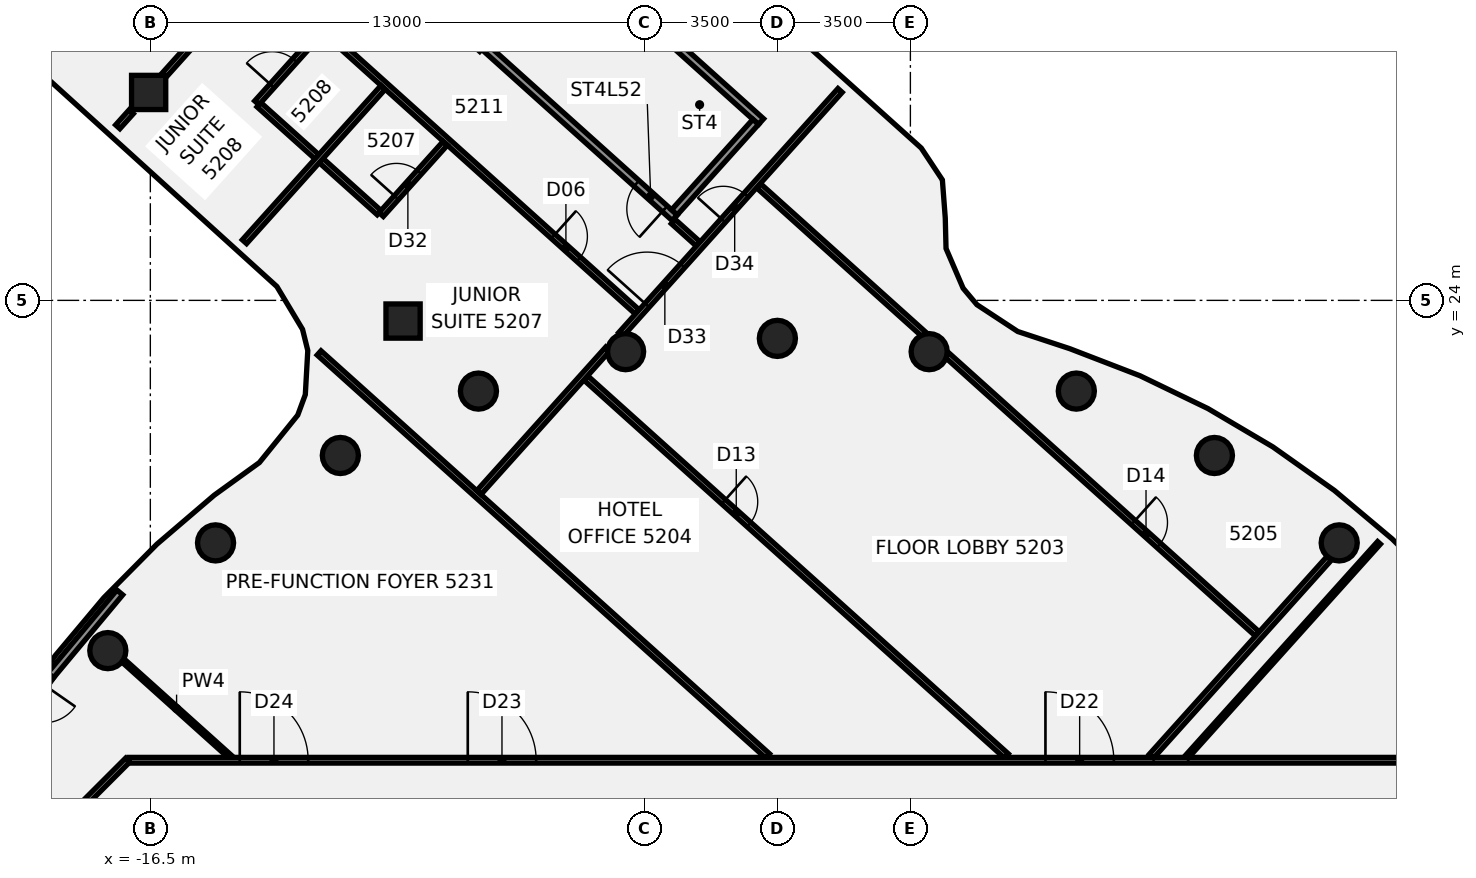
"""IFC4 building model, lengths in metres.
Left out: names, types, materials, properties, quantities, classifications, styles, units other than length and angle.
Written with IfcOpenShell. Run it as: python <this file> out.ifc"""

import sys

from ifc_helpers import new_model, si_unit, direction, frame, frame_2d, origin, origin_2d, place, context, subcontext, project, spatial, rectangle, circle, extrude, element, fill, save


model = new_model("IFC4")
c1 = context("Model", 3, precision=1e-05, world=origin(), true_north=direction((0.0, 1.0)))
c2 = subcontext(c1, "Body", "Model", "MODEL_VIEW")
j1 = project(units=[si_unit("LENGTHUNIT", "METRE"), si_unit("PLANEANGLEUNIT", "RADIAN")], contexts=[c1])
p1 = place(None, origin())
s1 = spatial("IfcSite", under=j1, at=p1, CompositionType="ELEMENT")
p2 = place(p1, origin())
s2 = spatial("IfcBuilding", under=s1, at=p2, CompositionType="ELEMENT")
p3 = place(p2, frame((0.0, 0.0, 207.7)))
s3 = spatial("IfcBuildingStorey", under=s2, at=p3, CompositionType="ELEMENT", Elevation=207.7)
for number, where, z_axis, x_axis in (
    (1, (14.784, 17.619, -0.14), (0.0, 0.0, 1.0), (1.0, 0.0, 0.0)),
    (2, (11.5, 19.919, -0.14), (0.0, 0.0, 1.0), (1.0, 0.0, 0.0)),
    (3, (7.866, 21.613, -0.14), (0.0, 0.0, 1.0), (1.0, 0.0, 0.0)),
    (4, (3.994, 22.651, -0.14), (0.0, 0.0, 1.0), (1.0, 0.0, 0.0)),
    (5, (0.0, 23.0, -0.14), (0.0, 0.0, 1.0), (1.0, 0.0, 0.0)),
    (6, (-3.994, 22.651, -0.14), (0.0, 0.0, 1.0), (1.0, 0.0, 0.0)),
    (7, (-7.866, 21.613, -0.14), (0.0, 0.0, 1.0), (1.0, 0.0, 0.0)),
    (8, (-11.5, 19.919, -0.14), (0.0, 0.0, 1.0), (1.0, 0.0, 0.0)),
    (9, (-14.784, 17.619, -0.14), (0.0, 0.0, 1.0), (1.0, 0.0, 0.0)),
    (10, (-17.619, 14.784, -0.14), (0.0, 0.0, 1.0), (1.0, 0.0, 0.0)),
):
    element("IfcColumn", number, at=place(p3, frame(where, z_axis=z_axis, x_axis=x_axis)), inside=s3, PredefinedType="COLUMN", context=c2, shape_type="SweptSolid", body=[
        extrude(circle(Radius=0.475, at=origin_2d()), origin(), (0.0, 0.0, 1.0), 3.6),
    ])
p4 = place(p3, frame((-16.545, 29.471, -0.138), z_axis=(-0.036894080952, -0.083794490133, 0.995799834412), x_axis=(0.666515072004, 0.740397972357, 0.08699713398)))
e11 = element("IfcColumn", 11, at=p4, inside=s3, PredefinedType="COLUMN", context=c2, shape_type="SweptSolid", body=[
    extrude(rectangle(XDim=0.9, YDim=0.9, at=origin_2d()), origin(), (0.0, 0.0, 1.0), 3.587),
])
p5 = place(p3, frame((-9.85, 23.456, -0.139), z_axis=(-0.006913509496, -0.049885715582, 0.998731004209), x_axis=(0.668247415628, 0.742767998212, 0.04172639858)))
e12 = element("IfcColumn", 12, at=p5, inside=s3, PredefinedType="COLUMN", context=c2, shape_type="SweptSolid", body=[
    extrude(rectangle(XDim=0.9, YDim=0.9, at=origin_2d()), origin(), (0.0, 0.0, 1.0), 3.602),
])
p6 = place(p3, frame((-17.217, 14.523, 0.0), z_axis=(0.0, 0.0, 1.0), x_axis=(0.743919147791, -0.668269632372, 0.0)))
e13 = element("IfcWall", 13, at=p6, inside=s3, PredefinedType="PARTITIONING", context=c2, shape_type="SweptSolid", body=[
    extrude(rectangle(XDim=3.786, YDim=0.1, at=frame_2d((1.893, 0.0))), origin(), (0.0, 0.0, 1.0), 2.864),
])
p7 = place(p3, frame((-13.642, 29.148, 0.0), z_axis=(0.0, 0.0, 1.0), x_axis=(0.744007909304, -0.668170809668, 0.0)))
e14 = element("IfcWall", 14, at=p7, inside=s3, PredefinedType="PARTITIONING", context=c2, shape_type="SweptSolid", body=[
    extrude(rectangle(XDim=4.25, YDim=0.15, at=frame_2d((2.125, 0.0))), origin(), (0.0, 0.0, 1.0), 2.864),
])
p8 = place(p3, frame((-13.612, 32.616, 0.0), z_axis=(0.0, 0.0, 1.0), x_axis=(0.743714415992, -0.668497470037, 0.0)))
e15 = element("IfcWall", 15, at=p8, inside=s3, PredefinedType="PARTITIONING", context=c2, shape_type="SweptSolid", body=[
    extrude(rectangle(XDim=13.34, YDim=0.15, at=frame_2d((6.67, 0.0))), origin(), (0.0, 0.0, 1.0), 2.864),
])
p9 = place(p8, frame((10.37, 0.0, 0.0)))
e16 = element("IfcOpeningElement", 16, at=p9, cuts=e15, PredefinedType="OPENING", context=c2, shape_type="SweptSolid", body=[
    extrude(rectangle(XDim=0.9, YDim=2.1, at=frame_2d((0.45, 1.05))), frame((0.0, 0.085, 0.0), z_axis=(0.0, -1.0, 0.0), x_axis=(1.0, 0.0, 0.0)), (0.0, 0.0, 1.0), 0.17),
])
p10 = place(p8, frame((0.82, 0.0, 0.0)))
e17 = element("IfcOpeningElement", 17, at=p10, cuts=e15, PredefinedType="OPENING", context=c2, shape_type="SweptSolid", body=[
    extrude(rectangle(XDim=0.9, YDim=2.1, at=frame_2d((0.45, 1.05))), frame((0.0, 0.085, 0.0), z_axis=(0.0, -1.0, 0.0), x_axis=(1.0, 0.0, 0.0)), (0.0, 0.0, 1.0), 0.17),
])
p11 = place(p3, frame((-2.739, 26.073, 0.0), z_axis=(0.0, 0.0, 1.0), x_axis=(0.743969878474, -0.668213154557, 0.0)))
e18 = element("IfcWall", 18, at=p11, inside=s3, PredefinedType="PARTITIONING", context=c2, shape_type="SweptSolid", body=[
    extrude(rectangle(XDim=0.88, YDim=0.15, at=frame_2d((0.44, 0.0))), origin(), (0.0, 0.0, 1.0), 2.864),
])
p12 = place(p3, frame((-12.059, 22.617, 0.0), z_axis=(0.0, 0.0, 1.0), x_axis=(0.743880712791, -0.668312415819, 0.0)))
e19 = element("IfcWall", 19, at=p12, inside=s3, PredefinedType="PARTITIONING", context=c2, shape_type="SweptSolid", body=[
    extrude(rectangle(XDim=15.866, YDim=0.15, at=frame_2d((7.933, 0.0))), origin(), (0.0, 0.0, 1.0), 2.864),
])
p13 = place(p3, frame((-5.04, 21.958, 0.0), z_axis=(0.0, 0.0, 1.0), x_axis=(0.743847907663, -0.668348928528, 0.0)))
e20 = element("IfcWall", 20, at=p13, inside=s3, PredefinedType="PARTITIONING", context=c2, shape_type="SweptSolid", body=[
    extrude(rectangle(XDim=14.878, YDim=0.15, at=frame_2d((7.439, 0.0))), origin(), (0.0, 0.0, 1.0), 2.864),
])
p14 = place(p13, frame((4.87, 0.0, 0.0)))
e21 = element("IfcOpeningElement", 21, at=p14, cuts=e20, PredefinedType="OPENING", context=c2, shape_type="SweptSolid", body=[
    extrude(rectangle(XDim=0.9, YDim=2.1, at=frame_2d((0.45, 1.05))), frame((0.0, 0.085, 0.0), z_axis=(0.0, -1.0, 0.0), x_axis=(1.0, 0.0, 0.0)), (0.0, 0.0, 1.0), 0.17),
])
p15 = place(p3, frame((-0.494, 27.015, 0.0), z_axis=(0.0, 0.0, 1.0), x_axis=(0.743820326934, -0.668379623597, 0.0)))
e22 = element("IfcWall", 22, at=p15, inside=s3, PredefinedType="PARTITIONING", context=c2, shape_type="SweptSolid", body=[
    extrude(rectangle(XDim=5.857, YDim=0.15, at=frame_2d((2.929, 0.0))), origin(), (0.0, 0.0, 1.0), 2.864),
])
p16 = place(p3, frame((4.457, 22.567, 0.0), z_axis=(0.0, 0.0, 1.0), x_axis=(0.74382000742, -0.668379979175, 0.0)))
e23 = element("IfcWall", 23, at=p16, inside=s3, PredefinedType="PARTITIONING", context=c2, shape_type="SweptSolid", body=[
    extrude(rectangle(XDim=10.984, YDim=0.15, at=frame_2d((5.492, 0.0))), origin(), (0.0, 0.0, 1.0), 2.864),
])
p17 = place(p16, frame((6.6, 0.0, 0.0)))
e24 = element("IfcOpeningElement", 24, at=p17, cuts=e23, PredefinedType="OPENING", context=c2, shape_type="SweptSolid", body=[
    extrude(rectangle(XDim=0.9, YDim=2.1, at=frame_2d((0.45, 1.05))), frame((0.0, 0.085, 0.0), z_axis=(0.0, -1.0, 0.0), x_axis=(1.0, 0.0, 0.0)), (0.0, 0.0, 1.0), 0.17),
])
p18 = place(p3, frame((-17.065, 11.9, 0.0), z_axis=(0.0, 0.0, 1.0), x_axis=(1.0, 0.0, 0.0)))
e25 = element("IfcWall", 25, at=p18, inside=s3, PredefinedType="PARTITIONING", context=c2, shape_type="SweptSolid", body=[
    extrude(rectangle(XDim=34.165, YDim=0.15, at=frame_2d((17.083, 0.0))), origin(), (0.0, 0.0, 1.0), 2.864),
])
p19 = place(p18, frame((24.119, 0.0, 0.0)))
e26 = element("IfcOpeningElement", 26, at=p19, cuts=e25, PredefinedType="OPENING", context=c2, shape_type="SweptSolid", body=[
    extrude(rectangle(XDim=1.8, YDim=2.1, at=frame_2d((0.9, 1.05))), frame((0.0, 0.085, 0.0), z_axis=(0.0, -1.0, 0.0), x_axis=(1.0, 0.0, 0.0)), (0.0, 0.0, 1.0), 0.17),
])
p20 = place(p18, frame((8.918, 0.0, 0.0)))
e27 = element("IfcOpeningElement", 27, at=p20, cuts=e25, PredefinedType="OPENING", context=c2, shape_type="SweptSolid", body=[
    extrude(rectangle(XDim=1.8, YDim=2.1, at=frame_2d((0.9, 1.05))), frame((0.0, 0.085, 0.0), z_axis=(0.0, -1.0, 0.0), x_axis=(1.0, 0.0, 0.0)), (0.0, 0.0, 1.0), 0.17),
])
p21 = place(p18, frame((2.918, 0.0, 0.0)))
e28 = element("IfcOpeningElement", 28, at=p21, cuts=e25, PredefinedType="OPENING", context=c2, shape_type="SweptSolid", body=[
    extrude(rectangle(XDim=1.8, YDim=2.1, at=frame_2d((0.9, 1.05))), frame((0.0, 0.085, 0.0), z_axis=(0.0, -1.0, 0.0), x_axis=(1.0, 0.0, 0.0)), (0.0, 0.0, 1.0), 0.17),
])
p22 = place(p3, frame((-18.872, 10.128, 0.0), z_axis=(0.0, 0.0, 1.0), x_axis=(0.707106781187, 0.707106781187, 0.0)))
e29 = element("IfcWall", 29, at=p22, inside=s3, PredefinedType="PARTITIONING", context=c2, shape_type="SweptSolid", body=[
    extrude(rectangle(XDim=2.505, YDim=0.15, at=frame_2d((1.253, 0.0))), origin(), (0.0, 0.0, 1.0), 2.864),
])
p23 = place(p3, frame((-17.357, 28.567, 0.0), z_axis=(0.0, 0.0, 1.0), x_axis=(0.668250502002, 0.743936332339, 0.0)))
e30 = element("IfcWall", 30, at=p23, inside=s3, PredefinedType="PARTITIONING", context=c2, shape_type="SweptSolid", body=[
    extrude(rectangle(XDim=0.529, YDim=0.15, at=frame_2d((0.265, 0.0))), origin(), (0.0, 0.0, 1.0), 2.864),
])
p24 = place(p3, frame((-16.292, 29.752, 0.0), z_axis=(0.0, 0.0, 1.0), x_axis=(0.668305639609, 0.743886800573, 0.0)))
e31 = element("IfcWall", 31, at=p24, inside=s3, PredefinedType="PARTITIONING", context=c2, shape_type="SweptSolid", body=[
    extrude(rectangle(XDim=9.93, YDim=0.15, at=frame_2d((4.965, 0.0))), origin(), (0.0, 0.0, 1.0), 2.864),
])
p25 = place(p24, frame((4.073, 0.0, 0.0)))
e32 = element("IfcOpeningElement", 32, at=p25, cuts=e31, PredefinedType="OPENING", context=c2, shape_type="SweptSolid", body=[
    extrude(rectangle(XDim=1.8, YDim=2.1, at=frame_2d((0.9, 1.05))), frame((0.0, 0.085, 0.0), z_axis=(0.0, -1.0, 0.0), x_axis=(1.0, 0.0, 0.0)), (0.0, 0.0, 1.0), 0.17),
])
p26 = place(p3, frame((-14.023, 25.544, 0.0), z_axis=(0.0, 0.0, 1.0), x_axis=(0.668287123149, 0.743903435288, 0.0)))
e33 = element("IfcWall", 33, at=p26, inside=s3, PredefinedType="PARTITIONING", context=c2, shape_type="SweptSolid", body=[
    extrude(rectangle(XDim=5.457, YDim=0.15, at=frame_2d((2.728, 0.0))), origin(), (0.0, 0.0, 1.0), 2.864),
])
p27 = place(p3, frame((-13.698, 29.198, 0.0), z_axis=(0.0, 0.0, 1.0), x_axis=(0.668418641187, 0.743785264787, 0.0)))
e34 = element("IfcWall", 34, at=p27, inside=s3, PredefinedType="PARTITIONING", context=c2, shape_type="SweptSolid", body=[
    extrude(rectangle(XDim=2.52, YDim=0.15, at=frame_2d((1.26, 0.0))), origin(), (0.0, 0.0, 1.0), 2.864),
])
p28 = place(p27, frame((0.6, 0.0, 0.0)))
e35 = element("IfcOpeningElement", 35, at=p28, cuts=e34, PredefinedType="OPENING", context=c2, shape_type="SweptSolid", body=[
    extrude(rectangle(XDim=0.9, YDim=2.1, at=frame_2d((0.45, 1.05))), frame((0.0, 0.085, 0.0), z_axis=(0.0, -1.0, 0.0), x_axis=(1.0, 0.0, 0.0)), (0.0, 0.0, 1.0), 0.17),
])
p29 = place(p3, frame((-10.425, 26.258, 0.0), z_axis=(0.0, 0.0, 1.0), x_axis=(0.668418641187, 0.743785264787, 0.0)))
e36 = element("IfcWall", 36, at=p29, inside=s3, PredefinedType="PARTITIONING", context=c2, shape_type="SweptSolid", body=[
    extrude(rectangle(XDim=2.52, YDim=0.15, at=frame_2d((1.26, 0.0))), origin(), (0.0, 0.0, 1.0), 2.864),
])
p30 = place(p29, frame((0.6, 0.0, 0.0)))
e37 = element("IfcOpeningElement", 37, at=p30, cuts=e36, PredefinedType="OPENING", context=c2, shape_type="SweptSolid", body=[
    extrude(rectangle(XDim=0.9, YDim=2.1, at=frame_2d((0.45, 1.05))), frame((0.0, 0.085, 0.0), z_axis=(0.0, -1.0, 0.0), x_axis=(1.0, 0.0, 0.0)), (0.0, 0.0, 1.0), 0.17),
])
p31 = place(p3, frame((-7.853, 18.946, 0.0), z_axis=(0.0, 0.0, 1.0), x_axis=(0.668252482961, 0.743934552912, 0.0)))
e38 = element("IfcWall", 38, at=p31, inside=s3, PredefinedType="PARTITIONING", context=c2, shape_type="SweptSolid", body=[
    extrude(rectangle(XDim=5.078, YDim=0.15, at=frame_2d((2.539, 0.0))), origin(), (0.0, 0.0, 1.0), 2.864),
])
p32 = place(p3, frame((-4.119, 23.102, 0.0), z_axis=(0.0, 0.0, 1.0), x_axis=(0.668236247313, 0.743949136552, 0.0)))
e39 = element("IfcWall", 39, at=p32, inside=s3, PredefinedType="PARTITIONING", context=c2, shape_type="SweptSolid", body=[
    extrude(rectangle(XDim=8.632, YDim=0.15, at=frame_2d((4.316, 0.0))), origin(), (0.0, 0.0, 1.0), 2.864),
])
p33 = place(p32, frame((1.033, 0.0, 0.0)))
e40 = element("IfcOpeningElement", 40, at=p33, cuts=e39, PredefinedType="OPENING", context=c2, shape_type="SweptSolid", body=[
    extrude(rectangle(XDim=1.4, YDim=2.1, at=frame_2d((0.7, 1.05))), frame((0.0, 0.085, 0.0), z_axis=(0.0, -1.0, 0.0), x_axis=(1.0, 0.0, 0.0)), (0.0, 0.0, 1.0), 0.17),
])
p34 = place(p32, frame((4.033, 0.0, 0.0)))
e41 = element("IfcOpeningElement", 41, at=p34, cuts=e39, PredefinedType="OPENING", context=c2, shape_type="SweptSolid", body=[
    extrude(rectangle(XDim=0.9, YDim=2.1, at=frame_2d((0.45, 1.05))), frame((0.0, 0.085, 0.0), z_axis=(0.0, -1.0, 0.0), x_axis=(1.0, 0.0, 0.0)), (0.0, 0.0, 1.0), 0.17),
])
p35 = place(p3, frame((10.772, 11.989, 0.0), z_axis=(0.0, 0.0, 1.0), x_axis=(0.66831410143, 0.743879198412, 0.0)))
e42 = element("IfcWall", 42, at=p35, inside=s3, PredefinedType="PARTITIONING", context=c2, shape_type="SweptSolid", body=[
    extrude(rectangle(XDim=7.57, YDim=0.1, at=frame_2d((3.785, 0.0))), origin(), (0.0, 0.0, 1.0), 2.864),
])
p36 = place(p3, frame((9.843, 12.008, 0.0), z_axis=(0.0, 0.0, 1.0), x_axis=(0.668361660756, 0.743836467533, 0.0)))
e43 = element("IfcWall", 43, at=p36, inside=s3, PredefinedType="PARTITIONING", context=c2, shape_type="SweptSolid", body=[
    extrude(rectangle(XDim=7.003, YDim=0.15, at=frame_2d((3.501, 0.0))), origin(), (0.0, 0.0, 1.0), 2.864),
])
p37 = place(p3, frame((-17.304, 16.315, 0.0), z_axis=(0.0, 0.0, 1.0), x_axis=(-0.640631790318, -0.767848233203, 0.0)))
e44 = element("IfcWall", 44, at=p37, inside=s3, PredefinedType="SOLIDWALL", context=c2, shape_type="SweptSolid", body=[
    extrude(rectangle(XDim=2.844, YDim=0.2, at=frame_2d((1.422, 0.0))), origin(), (0.0, 0.0, 1.0), 3.46),
])
p38 = place(p3, frame((-19.126, 14.132, 0.0), z_axis=(0.0, 0.0, 1.0), x_axis=(-0.572150562029, -0.820148605053, 0.0)))
e45 = element("IfcWall", 45, at=p38, inside=s3, PredefinedType="SOLIDWALL", context=c2, shape_type="SweptSolid", body=[
    extrude(rectangle(XDim=1.6, YDim=0.2, at=frame_2d((0.8, 0.0))), origin(), (0.0, 0.0, 1.0), 3.46),
])
p39 = place(p38, frame((0.3, 0.0, 0.0)))
e46 = element("IfcOpeningElement", 46, at=p39, cuts=e45, PredefinedType="OPENING", context=c2, shape_type="SweptSolid", body=[
    extrude(rectangle(XDim=1.0, YDim=2.4, at=frame_2d((0.5, 1.2))), frame((0.0, 0.11, 0.0), z_axis=(0.0, -1.0, 0.0), x_axis=(1.0, 0.0, 0.0)), (0.0, 0.0, 1.0), 0.22),
])
p40 = place(p3, frame((-2.702, 26.175, -0.14), z_axis=(0.0, 0.0, 1.0), x_axis=(-0.743866429865, 0.66832831342, 0.0)))
e47 = element("IfcWall", 47, at=p40, inside=s3, PredefinedType="SHEAR", context=c2, shape_type="SweptSolid", body=[
    extrude(rectangle(XDim=6.7, YDim=0.2, at=frame_2d((3.35, 0.0))), origin(), (0.0, 0.0, 1.0), 3.004),
])
p41 = place(p40, frame((0.35, 0.0, 0.0)))
e48 = element("IfcOpeningElement", 48, at=p41, cuts=e47, PredefinedType="OPENING", context=c2, shape_type="SweptSolid", body=[
    extrude(rectangle(XDim=1.0, YDim=2.1, at=frame_2d((0.5, 1.05))), frame((0.0, 0.11, 0.0), z_axis=(0.0, -1.0, 0.0), x_axis=(1.0, 0.0, 0.0)), (0.0, 0.0, 1.0), 0.22),
])
p42 = place(p3, frame((-0.429, 28.704, -0.14), z_axis=(0.0, 0.0, 1.0), x_axis=(-0.743866429865, 0.66832831342, 0.0)))
e49 = element("IfcWall", 49, at=p42, inside=s3, PredefinedType="SHEAR", context=c2, shape_type="SweptSolid", body=[
    extrude(rectangle(XDim=6.7, YDim=0.2, at=frame_2d((3.35, 0.0))), origin(), (0.0, 0.0, 1.0), 3.004),
])
p43 = place(p3, frame((-0.571, 28.697, -0.14), z_axis=(0.0, 0.0, 1.0), x_axis=(-0.668370152404, -0.743828837419, 0.0)))
e50 = element("IfcWall", 50, at=p43, inside=s3, PredefinedType="SHEAR", context=c2, shape_type="SweptSolid", body=[
    extrude(rectangle(XDim=3.2, YDim=0.2, at=frame_2d((1.6, 0.0))), origin(), (0.0, 0.0, 1.0), 3.004),
])
p44 = place(p9, frame((0.9, 0.0, 0.0), z_axis=(0.0, 0.0, 1.0), x_axis=(-1.0, 0.0, 0.0)))
e51 = element("IfcDoor", 51, at=p44, inside=s3, OperationType="SINGLE_SWING_RIGHT", PredefinedType="DOOR", context=c2, shape_type="SweptSolid", body=[
    extrude(rectangle(XDim=0.9, YDim=2.1, at=frame_2d((0.45, 1.05))), frame((0.0, 0.025, 0.0), z_axis=(0.0, -1.0, 0.0), x_axis=(1.0, 0.0, 0.0)), (0.0, 0.0, 1.0), 0.05),
])
fill(e16, e51)
p45 = place(p14, frame((0.9, 0.0, 0.0), z_axis=(0.0, 0.0, 1.0), x_axis=(-1.0, 0.0, 0.0)))
e52 = element("IfcDoor", 52, at=p45, inside=s3, OperationType="SINGLE_SWING_LEFT", PredefinedType="DOOR", context=c2, shape_type="SweptSolid", body=[
    extrude(rectangle(XDim=0.9, YDim=2.1, at=frame_2d((0.45, 1.05))), frame((0.0, 0.025, 0.0), z_axis=(0.0, -1.0, 0.0), x_axis=(1.0, 0.0, 0.0)), (0.0, 0.0, 1.0), 0.05),
])
fill(e21, e52)
p46 = place(p17, origin())
e53 = element("IfcDoor", 53, at=p46, inside=s3, OperationType="SINGLE_SWING_LEFT", PredefinedType="DOOR", context=c2, shape_type="SweptSolid", body=[
    extrude(rectangle(XDim=0.9, YDim=2.1, at=frame_2d((0.45, 1.05))), frame((0.0, 0.025, 0.0), z_axis=(0.0, -1.0, 0.0), x_axis=(1.0, 0.0, 0.0)), (0.0, 0.0, 1.0), 0.05),
])
fill(e24, e53)
p47 = place(p19, frame((1.8, 0.0, 0.0), z_axis=(0.0, 0.0, 1.0), x_axis=(-1.0, 0.0, 0.0)))
e54 = element("IfcDoor", 54, at=p47, inside=s3, OperationType="DOUBLE_DOOR_SINGLE_SWING", PredefinedType="DOOR", context=c2, shape_type="SweptSolid", body=[
    extrude(rectangle(XDim=1.8, YDim=2.1, at=frame_2d((0.9, 1.05))), frame((0.0, 0.025, 0.0), z_axis=(0.0, -1.0, 0.0), x_axis=(1.0, 0.0, 0.0)), (0.0, 0.0, 1.0), 0.05),
])
fill(e26, e54)
p48 = place(p20, origin())
e55 = element("IfcDoor", 55, at=p48, inside=s3, OperationType="DOUBLE_DOOR_SINGLE_SWING", PredefinedType="DOOR", context=c2, shape_type="SweptSolid", body=[
    extrude(rectangle(XDim=1.8, YDim=2.1, at=frame_2d((0.9, 1.05))), frame((0.0, 0.025, 0.0), z_axis=(0.0, -1.0, 0.0), x_axis=(1.0, 0.0, 0.0)), (0.0, 0.0, 1.0), 0.05),
])
fill(e27, e55)
p49 = place(p21, origin())
e56 = element("IfcDoor", 56, at=p49, inside=s3, OperationType="DOUBLE_DOOR_SINGLE_SWING", PredefinedType="DOOR", context=c2, shape_type="SweptSolid", body=[
    extrude(rectangle(XDim=1.8, YDim=2.1, at=frame_2d((0.9, 1.05))), frame((0.0, 0.025, 0.0), z_axis=(0.0, -1.0, 0.0), x_axis=(1.0, 0.0, 0.0)), (0.0, 0.0, 1.0), 0.05),
])
fill(e28, e56)
p50 = place(p28, frame((0.9, 0.0, 0.0), z_axis=(0.0, 0.0, 1.0), x_axis=(-1.0, 0.0, 0.0)))
e57 = element("IfcDoor", 57, at=p50, inside=s3, OperationType="SINGLE_SWING_LEFT", PredefinedType="DOOR", context=c2, shape_type="SweptSolid", body=[
    extrude(rectangle(XDim=0.9, YDim=2.1, at=frame_2d((0.45, 1.05))), frame((0.0, 0.025, 0.0), z_axis=(0.0, -1.0, 0.0), x_axis=(1.0, 0.0, 0.0)), (0.0, 0.0, 1.0), 0.05),
])
fill(e35, e57)
p51 = place(p30, origin())
e58 = element("IfcDoor", 58, at=p51, inside=s3, OperationType="SINGLE_SWING_RIGHT", PredefinedType="DOOR", context=c2, shape_type="SweptSolid", body=[
    extrude(rectangle(XDim=0.9, YDim=2.1, at=frame_2d((0.45, 1.05))), frame((0.0, 0.025, 0.0), z_axis=(0.0, -1.0, 0.0), x_axis=(1.0, 0.0, 0.0)), (0.0, 0.0, 1.0), 0.05),
])
fill(e37, e58)
p52 = place(p33, frame((1.4, 0.0, 0.0), z_axis=(0.0, 0.0, 1.0), x_axis=(-1.0, 0.0, 0.0)))
e59 = element("IfcDoor", 59, at=p52, inside=s3, OperationType="DOUBLE_DOOR_SINGLE_SWING", PredefinedType="DOOR", context=c2, shape_type="SweptSolid", body=[
    extrude(rectangle(XDim=1.4, YDim=2.1, at=frame_2d((0.7, 1.05))), frame((0.0, 0.025, 0.0), z_axis=(0.0, -1.0, 0.0), x_axis=(1.0, 0.0, 0.0)), (0.0, 0.0, 1.0), 0.05),
])
fill(e40, e59)
p53 = place(p34, origin())
e60 = element("IfcDoor", 60, at=p53, inside=s3, OperationType="SINGLE_SWING_LEFT", PredefinedType="DOOR", context=c2, shape_type="SweptSolid", body=[
    extrude(rectangle(XDim=0.9, YDim=2.1, at=frame_2d((0.45, 1.05))), frame((0.0, 0.025, 0.0), z_axis=(0.0, -1.0, 0.0), x_axis=(1.0, 0.0, 0.0)), (0.0, 0.0, 1.0), 0.05),
])
fill(e41, e60)
p54 = place(p41, origin())
e61 = element("IfcDoor", 61, at=p54, inside=s3, OperationType="SINGLE_SWING_LEFT", PredefinedType="DOOR", context=c2, shape_type="SweptSolid", body=[
    extrude(rectangle(XDim=1.0, YDim=2.1, at=frame_2d((0.5, 1.05))), frame((0.0, 0.025, 0.0), z_axis=(0.0, -1.0, 0.0), x_axis=(1.0, 0.0, 0.0)), (0.0, 0.0, 1.0), 0.05),
])
fill(e48, e61)
save(model, sys.argv[1])
